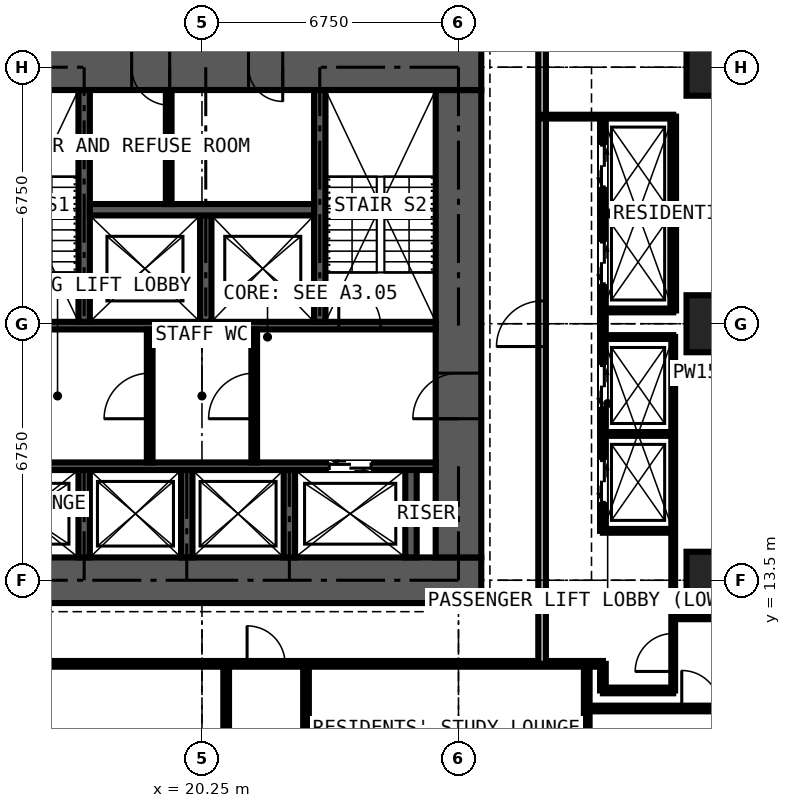
"""IFC4 building model, lengths in metres.
Left out: names, types, materials, properties, quantities, classifications, styles, units other than length and angle.
Written with IfcOpenShell. Run it as: python <this file> out.ifc"""

import sys

from ifc_helpers import new_model, si_unit, direction, frame, frame_2d, origin, origin_2d, place, context, subcontext, project, spatial, rectangle, extrude, element, fill, save


model = new_model("IFC4")
c1 = context("Model", 3, precision=1e-05, world=origin(), true_north=direction((0.0, 1.0)))
c2 = subcontext(c1, "Body", "Model", "MODEL_VIEW")
j1 = project(units=[si_unit("LENGTHUNIT", "METRE"), si_unit("PLANEANGLEUNIT", "RADIAN")], contexts=[c1])
p1 = place(None, origin())
s1 = spatial("IfcSite", under=j1, at=p1, CompositionType="ELEMENT")
p2 = place(p1, origin())
s2 = spatial("IfcBuilding", under=s1, at=p2, CompositionType="ELEMENT")
p3 = place(p2, frame((0.0, 0.0, 126.9)))
s3 = spatial("IfcBuildingStorey", under=s2, at=p3, CompositionType="ELEMENT", Elevation=126.9)
for number, where, z_axis, x_axis in (
    (1, (33.75, 13.5, 0.0), (0.0, 0.0, 1.0), (1.0, 0.0, 0.0)),
    (2, (33.75, 20.25, 0.0), (0.0, 0.0, 1.0), (1.0, 0.0, 0.0)),
    (3, (33.75, 27.0, 0.0), (0.0, 0.0, 1.0), (1.0, 0.0, 0.0)),
):
    element("IfcColumn", number, at=place(p3, frame(where, z_axis=z_axis, x_axis=x_axis)), inside=s3, PredefinedType="COLUMN", context=c2, shape_type="SweptSolid", body=[
        extrude(rectangle(XDim=1.5, YDim=1.5, at=origin_2d()), origin(), (0.0, 0.0, 1.0), 3.6),
    ])
p4 = place(p3, frame((12.9, 13.5, 0.0), z_axis=(0.0, 0.0, 1.0), x_axis=(1.0, 0.0, 0.0)))
e4 = element("IfcWall", 4, at=p4, inside=s3, PredefinedType="SHEAR", context=c2, shape_type="SweptSolid", body=[
    extrude(rectangle(XDim=14.7, YDim=1.2, at=frame_2d((7.35, 0.0))), origin(), (0.0, 0.0, 1.0), 3.6),
])
p5 = place(p3, frame((27.0, 14.1, 0.0), z_axis=(0.0, 0.0, 1.0), x_axis=(0.0, 1.0, 0.0)))
e5 = element("IfcWall", 5, at=p5, inside=s3, PredefinedType="SHEAR", context=c2, shape_type="SweptSolid", body=[
    extrude(rectangle(XDim=12.3, YDim=1.2, at=frame_2d((6.15, 0.0))), origin(), (0.0, 0.0, 1.0), 3.6),
])
p6 = place(p5, frame((3.65, 0.0, 0.0)))
e6 = element("IfcOpeningElement", 6, at=p6, cuts=e5, PredefinedType="OPENING", context=c2, shape_type="SweptSolid", body=[
    extrude(rectangle(XDim=1.2, YDim=2.2, at=frame_2d((0.6, 1.1))), frame((0.0, 0.61, 0.0), z_axis=(0.0, -1.0, 0.0), x_axis=(1.0, 0.0, 0.0)), (0.0, 0.0, 1.0), 1.22),
])
p7 = place(p3, frame((27.6, 27.0, 0.0), z_axis=(0.0, 0.0, 1.0), x_axis=(-1.0, 0.0, 0.0)))
e7 = element("IfcWall", 7, at=p7, inside=s3, PredefinedType="SHEAR", context=c2, shape_type="SweptSolid", body=[
    extrude(rectangle(XDim=14.7, YDim=1.2, at=frame_2d((7.35, 0.0))), origin(), (0.0, 0.0, 1.0), 3.6),
])
p8 = place(p7, frame((5.225, 0.0, 0.0)))
e8 = element("IfcOpeningElement", 8, at=p8, cuts=e7, PredefinedType="OPENING", context=c2, shape_type="SweptSolid", body=[
    extrude(rectangle(XDim=0.9, YDim=2.2, at=frame_2d((0.45, 1.1))), frame((0.0, 0.61, 0.0), z_axis=(0.0, -1.0, 0.0), x_axis=(1.0, 0.0, 0.0)), (0.0, 0.0, 1.0), 1.22),
])
p9 = place(p7, frame((8.2, 0.0, 0.0)))
e9 = element("IfcOpeningElement", 9, at=p9, cuts=e7, PredefinedType="OPENING", context=c2, shape_type="SweptSolid", body=[
    extrude(rectangle(XDim=1.0, YDim=2.2, at=frame_2d((0.5, 1.1))), frame((0.0, 0.61, 0.0), z_axis=(0.0, -1.0, 0.0), x_axis=(1.0, 0.0, 0.0)), (0.0, 0.0, 1.0), 1.22),
])
p10 = place(p3, frame((14.1, 16.5, 0.0), z_axis=(0.0, 0.0, 1.0), x_axis=(1.0, 0.0, 0.0)))
e10 = element("IfcWall", 10, at=p10, inside=s3, PredefinedType="SHEAR", context=c2, shape_type="SweptSolid", body=[
    extrude(rectangle(XDim=12.3, YDim=0.2, at=frame_2d((6.15, 0.0))), origin(), (0.0, 0.0, 1.0), 3.6),
])
p11 = place(p10, frame((0.9, 0.0, 0.0)))
e11 = element("IfcOpeningElement", 11, at=p11, cuts=e10, PredefinedType="OPENING", context=c2, shape_type="SweptSolid", body=[
    extrude(rectangle(XDim=1.1, YDim=2.2, at=frame_2d((0.55, 1.1))), frame((0.0, 0.11, 0.0), z_axis=(0.0, -1.0, 0.0), x_axis=(1.0, 0.0, 0.0)), (0.0, 0.0, 1.0), 0.22),
])
p12 = place(p10, frame((9.5, 0.0, 0.0)))
e12 = element("IfcOpeningElement", 12, at=p12, cuts=e10, PredefinedType="OPENING", context=c2, shape_type="SweptSolid", body=[
    extrude(rectangle(XDim=1.1, YDim=2.2, at=frame_2d((0.55, 1.1))), frame((0.0, 0.11, 0.0), z_axis=(0.0, -1.0, 0.0), x_axis=(1.0, 0.0, 0.0)), (0.0, 0.0, 1.0), 0.22),
])
p13 = place(p3, frame((14.1, 20.2, 0.0), z_axis=(0.0, 0.0, 1.0), x_axis=(1.0, 0.0, 0.0)))
e13 = element("IfcWall", 13, at=p13, inside=s3, PredefinedType="SHEAR", context=c2, shape_type="SweptSolid", body=[
    extrude(rectangle(XDim=12.3, YDim=0.2, at=frame_2d((6.15, 0.0))), origin(), (0.0, 0.0, 1.0), 3.6),
])
p14 = place(p13, frame((0.35, 0.0, 0.0)))
e14 = element("IfcOpeningElement", 14, at=p14, cuts=e13, PredefinedType="OPENING", context=c2, shape_type="SweptSolid", body=[
    extrude(rectangle(XDim=1.1, YDim=2.2, at=frame_2d((0.55, 1.1))), frame((0.0, 0.11, 0.0), z_axis=(0.0, -1.0, 0.0), x_axis=(1.0, 0.0, 0.0)), (0.0, 0.0, 1.0), 0.22),
])
p15 = place(p13, frame((9.75, 0.0, 0.0)))
e15 = element("IfcOpeningElement", 15, at=p15, cuts=e13, PredefinedType="OPENING", context=c2, shape_type="SweptSolid", body=[
    extrude(rectangle(XDim=1.1, YDim=2.2, at=frame_2d((0.55, 1.1))), frame((0.0, 0.11, 0.0), z_axis=(0.0, -1.0, 0.0), x_axis=(1.0, 0.0, 0.0)), (0.0, 0.0, 1.0), 0.22),
])
for number, where, z_axis, x_axis in (
    (16, (17.15, 20.3, 0.0), (0.0, 0.0, 1.0), (0.0, 1.0, 0.0)),
    (17, (23.35, 20.3, 0.0), (0.0, 0.0, 1.0), (0.0, 1.0, 0.0)),
):
    element("IfcWall", number, at=place(p3, frame(where, z_axis=z_axis, x_axis=x_axis)), inside=s3, PredefinedType="SHEAR", context=c2, shape_type="SweptSolid", body=[
        extrude(rectangle(XDim=6.1, YDim=0.3, at=frame_2d((3.05, 0.0))), origin(), (0.0, 0.0, 1.0), 3.6),
    ])
p16 = place(p3, frame((20.35, 20.3, 0.0), z_axis=(0.0, 0.0, 1.0), x_axis=(0.0, 1.0, 0.0)))
e18 = element("IfcWall", 18, at=p16, inside=s3, PredefinedType="SHEAR", context=c2, shape_type="SweptSolid", body=[
    extrude(rectangle(XDim=2.8, YDim=0.3, at=frame_2d((1.4, 0.0))), origin(), (0.0, 0.0, 1.0), 3.6),
])
p17 = place(p3, frame((17.3, 23.25, 0.0), z_axis=(0.0, 0.0, 1.0), x_axis=(1.0, 0.0, 0.0)))
e19 = element("IfcWall", 19, at=p17, inside=s3, PredefinedType="SHEAR", context=c2, shape_type="SweptSolid", body=[
    extrude(rectangle(XDim=5.9, YDim=0.3, at=frame_2d((2.95, 0.0))), origin(), (0.0, 0.0, 1.0), 3.6),
])
for number, where, z_axis, x_axis in (
    (20, (17.15, 14.1, 0.0), (0.0, 0.0, 1.0), (0.0, 1.0, 0.0)),
    (21, (19.85, 14.1, 0.0), (0.0, 0.0, 1.0), (0.0, 1.0, 0.0)),
    (22, (22.55, 14.1, 0.0), (0.0, 0.0, 1.0), (0.0, 1.0, 0.0)),
    (23, (25.75, 14.1, 0.0), (0.0, 0.0, 1.0), (0.0, 1.0, 0.0)),
):
    element("IfcWall", number, at=place(p3, frame(where, z_axis=z_axis, x_axis=x_axis)), inside=s3, PredefinedType="SHEAR", context=c2, shape_type="SweptSolid", body=[
        extrude(rectangle(XDim=2.3, YDim=0.3, at=frame_2d((1.15, 0.0))), origin(), (0.0, 0.0, 1.0), 3.6),
    ])
p18 = place(p3, frame((18.875, 16.6, 0.0), z_axis=(0.0, 0.0, 1.0), x_axis=(0.0, 1.0, 0.0)))
e24 = element("IfcWall", 24, at=p18, inside=s3, PredefinedType="PARTITIONING", context=c2, shape_type="SweptSolid", body=[
    extrude(rectangle(XDim=3.5, YDim=0.15, at=frame_2d((1.75, 0.0))), origin(), (0.0, 0.0, 1.0), 3.375),
])
p19 = place(p18, frame((1.15, 0.0, 0.0)))
e25 = element("IfcOpeningElement", 25, at=p19, cuts=e24, PredefinedType="OPENING", context=c2, shape_type="SweptSolid", body=[
    extrude(rectangle(XDim=1.2, YDim=2.2, at=frame_2d((0.6, 1.1))), frame((0.0, 0.085, 0.0), z_axis=(0.0, -1.0, 0.0), x_axis=(1.0, 0.0, 0.0)), (0.0, 0.0, 1.0), 0.17),
])
p20 = place(p3, frame((21.625, 16.6, 0.0), z_axis=(0.0, 0.0, 1.0), x_axis=(0.0, 1.0, 0.0)))
e26 = element("IfcWall", 26, at=p20, inside=s3, PredefinedType="PARTITIONING", context=c2, shape_type="SweptSolid", body=[
    extrude(rectangle(XDim=3.5, YDim=0.15, at=frame_2d((1.75, 0.0))), origin(), (0.0, 0.0, 1.0), 3.375),
])
p21 = place(p20, frame((1.15, 0.0, 0.0)))
e27 = element("IfcOpeningElement", 27, at=p21, cuts=e26, PredefinedType="OPENING", context=c2, shape_type="SweptSolid", body=[
    extrude(rectangle(XDim=1.2, YDim=2.2, at=frame_2d((0.6, 1.1))), frame((0.0, 0.085, 0.0), z_axis=(0.0, -1.0, 0.0), x_axis=(1.0, 0.0, 0.0)), (0.0, 0.0, 1.0), 0.17),
])
p22 = place(p3, frame((19.375, 23.4, 0.0), z_axis=(0.0, 0.0, 1.0), x_axis=(0.0, 1.0, 0.0)))
e28 = element("IfcWall", 28, at=p22, inside=s3, PredefinedType="PARTITIONING", context=c2, shape_type="SweptSolid", body=[
    extrude(rectangle(XDim=3.0, YDim=0.15, at=frame_2d((1.5, 0.0))), origin(), (0.0, 0.0, 1.0), 3.375),
])
p23 = place(p3, frame((10.125, 11.3, 0.0), z_axis=(0.0, 0.0, 1.0), x_axis=(1.0, 0.0, 0.0)))
e29 = element("IfcWall", 29, at=p23, inside=s3, PredefinedType="PARTITIONING", context=c2, shape_type="SweptSolid", body=[
    extrude(rectangle(XDim=20.675, YDim=0.15, at=frame_2d((10.337, 0.0))), origin(), (0.0, 0.0, 1.0), 3.375),
])
p24 = place(p23, frame((11.312, 0.0, 0.0)))
e30 = element("IfcOpeningElement", 30, at=p24, cuts=e29, PredefinedType="OPENING", context=c2, shape_type="SweptSolid", body=[
    extrude(rectangle(XDim=1.0, YDim=2.2, at=frame_2d((0.5, 1.1))), frame((0.0, 0.085, 0.0), z_axis=(0.0, -1.0, 0.0), x_axis=(1.0, 0.0, 0.0)), (0.0, 0.0, 1.0), 0.17),
])
for number, where, z_axis, x_axis in (
    (31, (20.887, 5.65, 0.0), (0.0, 0.0, 1.0), (0.0, 1.0, 0.0)),
    (32, (22.988, 5.65, 0.0), (0.0, 0.0, 1.0), (0.0, 1.0, 0.0)),
):
    element("IfcWall", number, at=place(p3, frame(where, z_axis=z_axis, x_axis=x_axis)), inside=s3, PredefinedType="PARTITIONING", context=c2, shape_type="SweptSolid", body=[
        extrude(rectangle(XDim=5.65, YDim=0.15, at=frame_2d((2.825, 0.0))), origin(), (0.0, 0.0, 1.0), 3.375),
    ])
p25 = place(p3, frame((29.2, 11.3, 0.0), z_axis=(0.0, 0.0, 1.0), x_axis=(0.0, 1.0, 0.0)))
e33 = element("IfcWall", 33, at=p25, inside=s3, PredefinedType="PARTITIONING", context=c2, shape_type="SweptSolid", body=[
    extrude(rectangle(XDim=17.9, YDim=0.2, at=frame_2d((8.95, 0.0))), origin(), (0.0, 0.0, 1.0), 3.375),
])
p26 = place(p25, frame((8.35, 0.0, 0.0)))
e34 = element("IfcOpeningElement", 34, at=p26, cuts=e33, PredefinedType="OPENING", context=c2, shape_type="SweptSolid", body=[
    extrude(rectangle(XDim=1.2, YDim=2.2, at=frame_2d((0.6, 1.1))), frame((0.0, 0.11, 0.0), z_axis=(0.0, -1.0, 0.0), x_axis=(1.0, 0.0, 0.0)), (0.0, 0.0, 1.0), 0.22),
])
p27 = place(p3, frame((29.2, 25.7, 0.0), z_axis=(0.0, 0.0, 1.0), x_axis=(1.0, 0.0, 0.0)))
e35 = element("IfcWall", 35, at=p27, inside=s3, PredefinedType="SHEAR", context=c2, shape_type="SweptSolid", body=[
    extrude(rectangle(XDim=3.45, YDim=0.1, at=frame_2d((1.725, 0.0))), origin(), (0.0, 0.0, 1.0), 3.375),
])
p28 = place(p3, frame((30.375, -0.734, 0.0), z_axis=(0.0, 0.0, 1.0), x_axis=(0.0, 1.0, 0.0)))
e36 = element("IfcWall", 36, at=p28, inside=s3, PredefinedType="PARTITIONING", context=c2, shape_type="SweptSolid", body=[
    extrude(rectangle(XDim=12.034, YDim=0.15, at=frame_2d((6.017, 0.0))), origin(), (0.0, 0.0, 1.0), 3.375),
])
p29 = place(p3, frame((30.375, 10.125, 0.0), z_axis=(0.0, 0.0, 1.0), x_axis=(1.0, 0.0, 0.0)))
e37 = element("IfcWall", 37, at=p29, inside=s3, PredefinedType="PARTITIONING", context=c2, shape_type="SweptSolid", body=[
    extrude(rectangle(XDim=10.859, YDim=0.15, at=frame_2d((5.429, 0.0))), origin(), (0.0, 0.0, 1.0), 3.375),
])
p30 = place(p29, frame((2.5, 0.0, 0.0)))
e38 = element("IfcOpeningElement", 38, at=p30, cuts=e37, PredefinedType="OPENING", context=c2, shape_type="SweptSolid", body=[
    extrude(rectangle(XDim=1.0, YDim=2.2, at=frame_2d((0.5, 1.1))), frame((0.0, 0.085, 0.0), z_axis=(0.0, -1.0, 0.0), x_axis=(1.0, 0.0, 0.0)), (0.0, 0.0, 1.0), 0.17),
])
p31 = place(p3, frame((30.8, 10.6, 0.0), z_axis=(0.0, 0.0, 1.0), x_axis=(0.0, 1.0, 0.0)))
e39 = element("IfcWall", 39, at=p31, inside=s3, PredefinedType="PARTITIONING", context=c2, shape_type="SweptSolid", body=[
    extrude(rectangle(XDim=0.7, YDim=0.15, at=frame_2d((0.35, 0.0))), origin(), (0.0, 0.0, 1.0), 3.375),
])
p32 = place(p3, frame((30.8, 10.6, 0.0), z_axis=(0.0, 0.0, 1.0), x_axis=(1.0, 0.0, 0.0)))
e40 = element("IfcWall", 40, at=p32, inside=s3, PredefinedType="PARTITIONING", context=c2, shape_type="SweptSolid", body=[
    extrude(rectangle(XDim=1.85, YDim=0.15, at=frame_2d((0.925, 0.0))), origin(), (0.0, 0.0, 1.0), 3.375),
])
p33 = place(p3, frame((30.8, 14.8, 0.0), z_axis=(0.0, 0.0, 1.0), x_axis=(0.0, 1.0, 0.0)))
e41 = element("IfcWall", 41, at=p33, inside=s3, PredefinedType="PARTITIONING", context=c2, shape_type="SweptSolid", body=[
    extrude(rectangle(XDim=10.9, YDim=0.15, at=frame_2d((5.45, 0.0))), origin(), (0.0, 0.0, 1.0), 3.375),
])
p34 = place(p33, frame((0.75, 0.0, 0.0)))
e42 = element("IfcOpeningElement", 42, at=p34, cuts=e41, PredefinedType="OPENING", context=c2, shape_type="SweptSolid", body=[
    extrude(rectangle(XDim=1.1, YDim=2.2, at=frame_2d((0.55, 1.1))), frame((0.0, 0.085, 0.0), z_axis=(0.0, -1.0, 0.0), x_axis=(1.0, 0.0, 0.0)), (0.0, 0.0, 1.0), 0.17),
])
p35 = place(p33, frame((3.25, 0.0, 0.0)))
e43 = element("IfcOpeningElement", 43, at=p35, cuts=e41, PredefinedType="OPENING", context=c2, shape_type="SweptSolid", body=[
    extrude(rectangle(XDim=1.1, YDim=2.2, at=frame_2d((0.55, 1.1))), frame((0.0, 0.085, 0.0), z_axis=(0.0, -1.0, 0.0), x_axis=(1.0, 0.0, 0.0)), (0.0, 0.0, 1.0), 0.17),
])
p36 = place(p33, frame((6.5, 0.0, 0.0)))
e44 = element("IfcOpeningElement", 44, at=p36, cuts=e41, PredefinedType="OPENING", context=c2, shape_type="SweptSolid", body=[
    extrude(rectangle(XDim=1.1, YDim=2.2, at=frame_2d((0.55, 1.1))), frame((0.0, 0.085, 0.0), z_axis=(0.0, -1.0, 0.0), x_axis=(1.0, 0.0, 0.0)), (0.0, 0.0, 1.0), 0.17),
])
p37 = place(p33, frame((9.05, 0.0, 0.0)))
e45 = element("IfcOpeningElement", 45, at=p37, cuts=e41, PredefinedType="OPENING", context=c2, shape_type="SweptSolid", body=[
    extrude(rectangle(XDim=1.1, YDim=2.2, at=frame_2d((0.55, 1.1))), frame((0.0, 0.085, 0.0), z_axis=(0.0, -1.0, 0.0), x_axis=(1.0, 0.0, 0.0)), (0.0, 0.0, 1.0), 0.17),
])
for number, where, z_axis, x_axis in (
    (46, (30.8, 14.8, 0.0), (0.0, 0.0, 1.0), (1.0, 0.0, 0.0)),
    (47, (30.8, 17.35, 0.0), (0.0, 0.0, 1.0), (1.0, 0.0, 0.0)),
    (48, (30.8, 19.9, 0.0), (0.0, 0.0, 1.0), (1.0, 0.0, 0.0)),
    (49, (30.8, 20.6, 0.0), (0.0, 0.0, 1.0), (1.0, 0.0, 0.0)),
    (50, (30.8, 23.15, 0.0), (0.0, 0.0, 1.0), (1.0, 0.0, 0.0)),
):
    element("IfcWall", number, at=place(p3, frame(where, z_axis=z_axis, x_axis=x_axis)), inside=s3, PredefinedType="SHEAR", context=c2, shape_type="SweptSolid", body=[
        extrude(rectangle(XDim=1.85, YDim=0.1, at=frame_2d((0.925, 0.0))), origin(), (0.0, 0.0, 1.0), 3.375),
    ])
p38 = place(p3, frame((32.65, 10.6, 0.0), z_axis=(0.0, 0.0, 1.0), x_axis=(0.0, 1.0, 0.0)))
e51 = element("IfcWall", 51, at=p38, inside=s3, PredefinedType="SHEAR", context=c2, shape_type="SweptSolid", body=[
    extrude(rectangle(XDim=9.3, YDim=0.1, at=frame_2d((4.65, 0.0))), origin(), (0.0, 0.0, 1.0), 3.375),
])
p39 = place(p38, frame((0.5, 0.0, 0.0)))
e52 = element("IfcOpeningElement", 52, at=p39, cuts=e51, PredefinedType="OPENING", context=c2, shape_type="SweptSolid", body=[
    extrude(rectangle(XDim=1.0, YDim=2.2, at=frame_2d((0.5, 1.1))), frame((0.0, 0.06, 0.0), z_axis=(0.0, -1.0, 0.0), x_axis=(1.0, 0.0, 0.0)), (0.0, 0.0, 1.0), 0.12),
])
p40 = place(p3, frame((32.65, 12.55, 0.0), z_axis=(0.0, 0.0, 1.0), x_axis=(1.0, 0.0, 0.0)))
e53 = element("IfcWall", 53, at=p40, inside=s3, PredefinedType="PARTITIONING", context=c2, shape_type="SweptSolid", body=[
    extrude(rectangle(XDim=2.2, YDim=0.15, at=frame_2d((1.1, 0.0))), origin(), (0.0, 0.0, 1.0), 3.375),
])
p41 = place(p3, frame((32.65, 20.6, 0.0), z_axis=(0.0, 0.0, 1.0), x_axis=(0.0, 1.0, 0.0)))
e54 = element("IfcWall", 54, at=p41, inside=s3, PredefinedType="PARTITIONING", context=c2, shape_type="SweptSolid", body=[
    extrude(rectangle(XDim=5.1, YDim=0.15, at=frame_2d((2.55, 0.0))), origin(), (0.0, 0.0, 1.0), 3.375),
])
p42 = place(p12, origin())
e55 = element("IfcDoor", 55, at=p42, inside=s3, OperationType="DOUBLE_DOOR_SLIDING", PredefinedType="DOOR", context=c2, shape_type="SweptSolid", body=[
    extrude(rectangle(XDim=1.1, YDim=2.2, at=frame_2d((0.55, 1.1))), frame((0.0, 0.025, 0.0), z_axis=(0.0, -1.0, 0.0), x_axis=(1.0, 0.0, 0.0)), (0.0, 0.0, 1.0), 0.05),
])
fill(e12, e55)
p43 = place(p6, origin())
e56 = element("IfcDoor", 56, at=p43, inside=s3, OperationType="DOUBLE_DOOR_SINGLE_SWING", PredefinedType="DOOR", context=c2, shape_type="SweptSolid", body=[
    extrude(rectangle(XDim=1.2, YDim=2.2, at=frame_2d((0.6, 1.1))), frame((0.0, 0.025, 0.0), z_axis=(0.0, -1.0, 0.0), x_axis=(1.0, 0.0, 0.0)), (0.0, 0.0, 1.0), 0.05),
])
fill(e6, e56)
p44 = place(p19, origin())
e57 = element("IfcDoor", 57, at=p44, inside=s3, OperationType="DOUBLE_DOOR_SINGLE_SWING", PredefinedType="DOOR", context=c2, shape_type="SweptSolid", body=[
    extrude(rectangle(XDim=1.2, YDim=2.2, at=frame_2d((0.6, 1.1))), frame((0.0, 0.025, 0.0), z_axis=(0.0, -1.0, 0.0), x_axis=(1.0, 0.0, 0.0)), (0.0, 0.0, 1.0), 0.05),
])
fill(e25, e57)
p45 = place(p21, origin())
e58 = element("IfcDoor", 58, at=p45, inside=s3, OperationType="DOUBLE_DOOR_SINGLE_SWING", PredefinedType="DOOR", context=c2, shape_type="SweptSolid", body=[
    extrude(rectangle(XDim=1.2, YDim=2.2, at=frame_2d((0.6, 1.1))), frame((0.0, 0.025, 0.0), z_axis=(0.0, -1.0, 0.0), x_axis=(1.0, 0.0, 0.0)), (0.0, 0.0, 1.0), 0.05),
])
fill(e27, e58)
p46 = place(p8, origin())
e59 = element("IfcDoor", 59, at=p46, inside=s3, OperationType="SINGLE_SWING_LEFT", PredefinedType="DOOR", context=c2, shape_type="SweptSolid", body=[
    extrude(rectangle(XDim=0.9, YDim=2.2, at=frame_2d((0.45, 1.1))), frame((0.0, 0.4, 0.0), z_axis=(0.0, -1.0, 0.0), x_axis=(1.0, 0.0, 0.0)), (0.0, 0.0, 1.0), 0.8),
])
fill(e8, e59)
p47 = place(p9, origin())
e60 = element("IfcDoor", 60, at=p47, inside=s3, OperationType="SINGLE_SWING_LEFT", PredefinedType="DOOR", context=c2, shape_type="SweptSolid", body=[
    extrude(rectangle(XDim=1.0, YDim=2.2, at=frame_2d((0.5, 1.1))), frame((0.0, 0.025, 0.0), z_axis=(0.0, -1.0, 0.0), x_axis=(1.0, 0.0, 0.0)), (0.0, 0.0, 1.0), 0.05),
])
fill(e9, e60)
p48 = place(p15, origin())
e61 = element("IfcDoor", 61, at=p48, inside=s3, OperationType="SINGLE_SWING_LEFT", PredefinedType="DOOR", context=c2, shape_type="SweptSolid", body=[
    extrude(rectangle(XDim=1.1, YDim=2.2, at=frame_2d((0.55, 1.1))), frame((0.0, 0.025, 0.0), z_axis=(0.0, -1.0, 0.0), x_axis=(1.0, 0.0, 0.0)), (0.0, 0.0, 1.0), 0.05),
])
fill(e15, e61)
p49 = place(p24, origin())
e62 = element("IfcDoor", 62, at=p49, inside=s3, OperationType="SINGLE_SWING_LEFT", PredefinedType="DOOR", context=c2, shape_type="SweptSolid", body=[
    extrude(rectangle(XDim=1.0, YDim=2.2, at=frame_2d((0.5, 1.1))), frame((0.0, 0.025, 0.0), z_axis=(0.0, -1.0, 0.0), x_axis=(1.0, 0.0, 0.0)), (0.0, 0.0, 1.0), 0.05),
])
fill(e30, e62)
p50 = place(p30, origin())
e63 = element("IfcDoor", 63, at=p50, inside=s3, OperationType="SINGLE_SWING_LEFT", PredefinedType="DOOR", context=c2, shape_type="SweptSolid", body=[
    extrude(rectangle(XDim=1.0, YDim=2.2, at=frame_2d((0.5, 1.1))), frame((0.0, 0.025, 0.0), z_axis=(0.0, -1.0, 0.0), x_axis=(1.0, 0.0, 0.0)), (0.0, 0.0, 1.0), 0.05),
])
fill(e38, e63)
p51 = place(p39, origin())
e64 = element("IfcDoor", 64, at=p51, inside=s3, OperationType="SINGLE_SWING_LEFT", PredefinedType="DOOR", context=c2, shape_type="SweptSolid", body=[
    extrude(rectangle(XDim=1.0, YDim=2.2, at=frame_2d((0.5, 1.1))), frame((0.0, 0.025, 0.0), z_axis=(0.0, -1.0, 0.0), x_axis=(1.0, 0.0, 0.0)), (0.0, 0.0, 1.0), 0.05),
])
fill(e52, e64)
p52 = place(p34, origin())
e65 = element("IfcDoor", 65, at=p52, inside=s3, OperationType="DOUBLE_DOOR_SLIDING", PredefinedType="DOOR", context=c2, shape_type="SweptSolid", body=[
    extrude(rectangle(XDim=1.1, YDim=2.2, at=frame_2d((0.55, 1.1))), frame((0.0, 0.025, 0.0), z_axis=(0.0, -1.0, 0.0), x_axis=(1.0, 0.0, 0.0)), (0.0, 0.0, 1.0), 0.05),
])
fill(e42, e65)
p53 = place(p35, origin())
e66 = element("IfcDoor", 66, at=p53, inside=s3, OperationType="DOUBLE_DOOR_SLIDING", PredefinedType="DOOR", context=c2, shape_type="SweptSolid", body=[
    extrude(rectangle(XDim=1.1, YDim=2.2, at=frame_2d((0.55, 1.1))), frame((0.0, 0.025, 0.0), z_axis=(0.0, -1.0, 0.0), x_axis=(1.0, 0.0, 0.0)), (0.0, 0.0, 1.0), 0.05),
])
fill(e43, e66)
p54 = place(p36, origin())
e67 = element("IfcDoor", 67, at=p54, inside=s3, OperationType="DOUBLE_DOOR_SLIDING", PredefinedType="DOOR", context=c2, shape_type="SweptSolid", body=[
    extrude(rectangle(XDim=1.1, YDim=2.2, at=frame_2d((0.55, 1.1))), frame((0.0, 0.025, 0.0), z_axis=(0.0, -1.0, 0.0), x_axis=(1.0, 0.0, 0.0)), (0.0, 0.0, 1.0), 0.05),
])
fill(e44, e67)
p55 = place(p37, origin())
e68 = element("IfcDoor", 68, at=p55, inside=s3, OperationType="DOUBLE_DOOR_SLIDING", PredefinedType="DOOR", context=c2, shape_type="SweptSolid", body=[
    extrude(rectangle(XDim=1.1, YDim=2.2, at=frame_2d((0.55, 1.1))), frame((0.0, 0.025, 0.0), z_axis=(0.0, -1.0, 0.0), x_axis=(1.0, 0.0, 0.0)), (0.0, 0.0, 1.0), 0.05),
])
fill(e45, e68)
p56 = place(p26, origin())
e69 = element("IfcDoor", 69, at=p56, inside=s3, OperationType="DOUBLE_DOOR_SINGLE_SWING", PredefinedType="DOOR", context=c2, shape_type="SweptSolid", body=[
    extrude(rectangle(XDim=1.2, YDim=2.2, at=frame_2d((0.6, 1.1))), frame((0.0, 0.025, 0.0), z_axis=(0.0, -1.0, 0.0), x_axis=(1.0, 0.0, 0.0)), (0.0, 0.0, 1.0), 0.05),
])
fill(e34, e69)
save(model, sys.argv[1])
